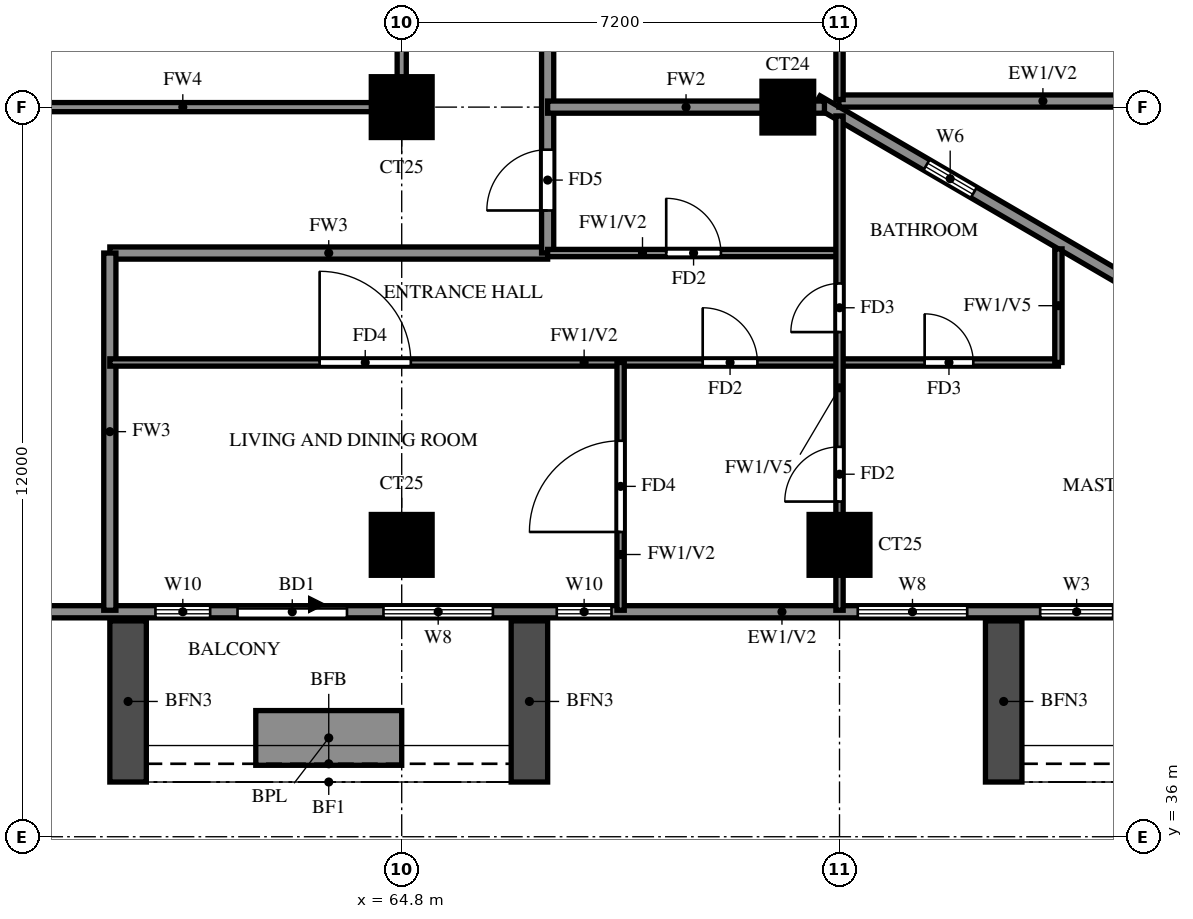
"""IFC4 building model, lengths in metres.
Left out: names, types, materials, properties, quantities, classifications, styles, units other than length and angle.
Written with IfcOpenShell. Run it as: python <this file> out.ifc"""

import sys

from ifc_helpers import new_model, si_unit, direction, frame, frame_2d, origin, origin_2d, place, context, subcontext, project, spatial, rectangle, extrude, source, transform, mapped, element, fill, save


model = new_model("IFC4")
c1 = context("Model", 3, precision=1e-05, world=origin(), true_north=direction((0.0, 1.0)))
c2 = subcontext(c1, "Body", "Model", "MODEL_VIEW")
j1 = project(units=[si_unit("LENGTHUNIT", "METRE"), si_unit("PLANEANGLEUNIT", "RADIAN")], contexts=[c1])
p1 = place(None, origin())
s1 = spatial("IfcSite", under=j1, at=p1, CompositionType="ELEMENT")
p2 = place(p1, origin())
s2 = spatial("IfcBuilding", under=s1, at=p2, CompositionType="ELEMENT")
p3 = place(p2, frame((0.0, 0.0, 153.5)))
s3 = spatial("IfcBuildingStorey", under=s2, at=p3, CompositionType="ELEMENT", Elevation=153.5)
m1 = source(origin(), c2, "Body", "SweptSolid", [
    extrude(rectangle(XDim=1.0, YDim=1.0, at=origin_2d()), origin(), (0.0, 0.0, 1.0), 3.2),
])
for number, where, z_axis, x_axis in (
    (1, (64.8, 40.8, 0.0), (0.0, 0.0, 1.0), (1.0, 0.0, 0.0)),
    (2, (72.0, 40.8, 0.0), (0.0, 0.0, 1.0), (1.0, 0.0, 0.0)),
    (3, (64.8, 48.0, 0.0), (0.0, 0.0, 1.0), (1.0, 0.0, 0.0)),
):
    element("IfcColumn", number, at=place(p3, frame(where, z_axis=z_axis, x_axis=x_axis)), inside=s3, PredefinedType="COLUMN", context=c2, shape_type="MappedRepresentation", body=[
        mapped(m1, transform((0.0, 0.0, 0.0))),
    ])
m2 = source(origin(), c2, "Body", "SweptSolid", [
    extrude(rectangle(XDim=0.85, YDim=0.85, at=origin_2d()), origin(), (0.0, 0.0, 1.0), 3.2),
])
p4 = place(p3, frame((71.15, 48.0, 0.0), z_axis=(0.0, 0.0, 1.0), x_axis=(1.0, 0.0, 0.0)))
e4 = element("IfcColumn", 4, at=p4, inside=s3, PredefinedType="COLUMN", context=c2, shape_type="MappedRepresentation", body=[
    mapped(m2, transform((0.0, 0.0, 0.0))),
])
p5 = place(p3, frame((85.719, 39.881, 0.0), z_axis=(0.0, 0.0, 1.0), x_axis=(-0.86377618652, 0.503875678716, 0.0)))
e5 = element("IfcWall", 5, at=p5, inside=s3, PredefinedType="SOLIDWALL", context=c2, shape_type="SweptSolid", body=[
    extrude(rectangle(XDim=16.311, YDim=0.2, at=frame_2d((8.156, 0.0))), origin(), (0.0, 0.0, 1.0), 3.2),
])
p6 = place(p5, frame((13.326, 0.0, 1.5)))
e6 = element("IfcOpeningElement", 6, at=p6, cuts=e5, PredefinedType="OPENING", context=c2, shape_type="SweptSolid", body=[
    extrude(rectangle(XDim=0.9, YDim=0.9, at=frame_2d((0.45, 0.45))), frame((0.0, 0.11, 0.0), z_axis=(0.0, -1.0, 0.0), x_axis=(1.0, 0.0, 0.0)), (0.0, 0.0, 1.0), 0.22),
])
p7 = place(p3, frame((71.99, 48.1, 0.0), z_axis=(0.0, 0.0, 1.0), x_axis=(1.0, 0.0, 0.0)))
e7 = element("IfcWall", 7, at=p7, inside=s3, PredefinedType="SOLIDWALL", context=c2, shape_type="SweptSolid", body=[
    extrude(rectangle(XDim=6.71, YDim=0.2, at=frame_2d((3.355, 0.0))), origin(), (0.0, 0.0, 1.0), 3.2),
])
p8 = place(p3, frame((58.8, 39.7, 0.0), z_axis=(0.0, 0.0, 1.0), x_axis=(1.0, 0.0, 0.0)))
e8 = element("IfcWall", 8, at=p8, inside=s3, PredefinedType="SOLIDWALL", context=c2, shape_type="SweptSolid", body=[
    extrude(rectangle(XDim=27.23, YDim=0.2, at=frame_2d((13.615, 0.0))), origin(), (0.0, 0.0, 1.0), 3.2),
])
p9 = place(p8, frame((3.3, 0.0, 0.0)))
e9 = element("IfcOpeningElement", 9, at=p9, cuts=e8, PredefinedType="OPENING", context=c2, shape_type="SweptSolid", body=[
    extrude(rectangle(XDim=1.8, YDim=2.4, at=frame_2d((0.9, 1.2))), frame((0.0, 0.11, 0.0), z_axis=(0.0, -1.0, 0.0), x_axis=(1.0, 0.0, 0.0)), (0.0, 0.0, 1.0), 0.22),
])
p10 = place(p8, frame((18.3, 0.0, 0.0)))
e10 = element("IfcOpeningElement", 10, at=p10, cuts=e8, PredefinedType="OPENING", context=c2, shape_type="SweptSolid", body=[
    extrude(rectangle(XDim=1.8, YDim=2.4, at=frame_2d((0.9, 1.2))), frame((0.0, 0.11, 0.0), z_axis=(0.0, -1.0, 0.0), x_axis=(1.0, 0.0, 0.0)), (0.0, 0.0, 1.0), 0.22),
])
p11 = place(p8, frame((1.95, 0.0, 0.6)))
e11 = element("IfcOpeningElement", 11, at=p11, cuts=e8, PredefinedType="OPENING", context=c2, shape_type="SweptSolid", body=[
    extrude(rectangle(XDim=0.9, YDim=2.4, at=frame_2d((0.45, 1.2))), frame((0.0, 0.11, 0.0), z_axis=(0.0, -1.0, 0.0), x_axis=(1.0, 0.0, 0.0)), (0.0, 0.0, 1.0), 0.22),
])
p12 = place(p8, frame((5.7, 0.0, 0.6)))
e12 = element("IfcOpeningElement", 12, at=p12, cuts=e8, PredefinedType="OPENING", context=c2, shape_type="SweptSolid", body=[
    extrude(rectangle(XDim=1.8, YDim=2.4, at=frame_2d((0.9, 1.2))), frame((0.0, 0.11, 0.0), z_axis=(0.0, -1.0, 0.0), x_axis=(1.0, 0.0, 0.0)), (0.0, 0.0, 1.0), 0.22),
])
p13 = place(p8, frame((8.55, 0.0, 0.6)))
e13 = element("IfcOpeningElement", 13, at=p13, cuts=e8, PredefinedType="OPENING", context=c2, shape_type="SweptSolid", body=[
    extrude(rectangle(XDim=0.9, YDim=2.4, at=frame_2d((0.45, 1.2))), frame((0.0, 0.11, 0.0), z_axis=(0.0, -1.0, 0.0), x_axis=(1.0, 0.0, 0.0)), (0.0, 0.0, 1.0), 0.22),
])
p14 = place(p8, frame((13.5, 0.0, 0.6)))
e14 = element("IfcOpeningElement", 14, at=p14, cuts=e8, PredefinedType="OPENING", context=c2, shape_type="SweptSolid", body=[
    extrude(rectangle(XDim=1.8, YDim=2.4, at=frame_2d((0.9, 1.2))), frame((0.0, 0.11, 0.0), z_axis=(0.0, -1.0, 0.0), x_axis=(1.0, 0.0, 0.0)), (0.0, 0.0, 1.0), 0.22),
])
p15 = place(p8, frame((16.5, 0.0, 0.6)))
e15 = element("IfcOpeningElement", 15, at=p15, cuts=e8, PredefinedType="OPENING", context=c2, shape_type="SweptSolid", body=[
    extrude(rectangle(XDim=1.2, YDim=2.4, at=frame_2d((0.6, 1.2))), frame((0.0, 0.11, 0.0), z_axis=(0.0, -1.0, 0.0), x_axis=(1.0, 0.0, 0.0)), (0.0, 0.0, 1.0), 0.22),
])
p16 = place(p8, frame((20.7, 0.0, 0.6)))
e16 = element("IfcOpeningElement", 16, at=p16, cuts=e8, PredefinedType="OPENING", context=c2, shape_type="SweptSolid", body=[
    extrude(rectangle(XDim=1.2, YDim=2.4, at=frame_2d((0.6, 1.2))), frame((0.0, 0.11, 0.0), z_axis=(0.0, -1.0, 0.0), x_axis=(1.0, 0.0, 0.0)), (0.0, 0.0, 1.0), 0.22),
])
p17 = place(p8, frame((23.051, 0.0, 0.6)))
e17 = element("IfcOpeningElement", 17, at=p17, cuts=e8, PredefinedType="OPENING", context=c2, shape_type="SweptSolid", body=[
    extrude(rectangle(XDim=1.8, YDim=2.4, at=frame_2d((0.9, 1.2))), frame((0.0, 0.11, 0.0), z_axis=(0.0, -1.0, 0.0), x_axis=(1.0, 0.0, 0.0)), (0.0, 0.0, 1.0), 0.22),
])
p18 = place(p8, frame((25.99, 0.0, 0.6)))
e18 = element("IfcOpeningElement", 18, at=p18, cuts=e8, PredefinedType="OPENING", context=c2, shape_type="SweptSolid", body=[
    extrude(rectangle(XDim=0.9, YDim=2.4, at=frame_2d((0.45, 1.2))), frame((0.0, 0.11, 0.0), z_axis=(0.0, -1.0, 0.0), x_axis=(1.0, 0.0, 0.0)), (0.0, 0.0, 1.0), 0.22),
])
for number, where, z_axis, x_axis in (
    (19, (60.3, 39.55, 0.0), (0.0, 0.0, 1.0), (0.0, -1.0, 0.0)),
    (20, (66.9, 39.55, 0.0), (0.0, 0.0, 1.0), (0.0, -1.0, 0.0)),
):
    element("IfcWall", number, at=place(p3, frame(where, z_axis=z_axis, x_axis=x_axis)), inside=s3, PredefinedType="SOLIDWALL", context=c2, shape_type="SweptSolid", body=[
        extrude(rectangle(XDim=2.65, YDim=0.6, at=frame_2d((1.325, 0.0))), origin(), (0.0, 0.0, 1.0), 2.85),
    ])
p19 = place(p3, frame((62.4, 37.625, 0.0), z_axis=(0.0, 0.0, 1.0), x_axis=(1.0, 0.0, 0.0)))
e21 = element("IfcWall", 21, at=p19, inside=s3, PredefinedType="SOLIDWALL", context=c2, shape_type="SweptSolid", body=[
    extrude(rectangle(XDim=2.4, YDim=0.9, at=frame_2d((1.2, 0.0))), origin(), (0.0, 0.0, 1.0), 0.9),
])
p20 = place(p3, frame((74.7, 39.55, 0.0), z_axis=(0.0, 0.0, 1.0), x_axis=(0.0, -1.0, 0.0)))
e22 = element("IfcWall", 22, at=p20, inside=s3, PredefinedType="SOLIDWALL", context=c2, shape_type="SweptSolid", body=[
    extrude(rectangle(XDim=2.65, YDim=0.6, at=frame_2d((1.325, 0.0))), origin(), (0.0, 0.0, 1.0), 2.85),
])
p21 = place(p3, frame((60.0, 45.6, 0.0), z_axis=(0.0, 0.0, 1.0), x_axis=(1.0, 0.0, 0.0)))
e23 = element("IfcWall", 23, at=p21, inside=s3, PredefinedType="SOLIDWALL", context=c2, shape_type="SweptSolid", body=[
    extrude(rectangle(XDim=7.2, YDim=0.2, at=frame_2d((3.6, 0.0))), origin(), (0.0, 0.0, 1.0), 3.2),
])
p22 = place(p3, frame((60.0, 39.725, 0.0), z_axis=(0.0, 0.0, 1.0), x_axis=(0.0, 1.0, 0.0)))
e24 = element("IfcWall", 24, at=p22, inside=s3, PredefinedType="SOLIDWALL", context=c2, shape_type="SweptSolid", body=[
    extrude(rectangle(XDim=5.875, YDim=0.2, at=frame_2d((2.938, 0.0))), origin(), (0.0, 0.0, 1.0), 3.2),
])
p23 = place(p3, frame((67.2, 45.6, 0.0), z_axis=(0.0, 0.0, 1.0), x_axis=(0.0, 1.0, 0.0)))
e25 = element("IfcWall", 25, at=p23, inside=s3, PredefinedType="SOLIDWALL", context=c2, shape_type="SweptSolid", body=[
    extrude(rectangle(XDim=12.0, YDim=0.2, at=frame_2d((6.0, 0.0))), origin(), (0.0, 0.0, 1.0), 3.2),
])
p24 = place(p23, frame((10.3, 0.0, 0.0)))
e26 = element("IfcOpeningElement", 26, at=p24, cuts=e25, PredefinedType="OPENING", context=c2, shape_type="SweptSolid", body=[
    extrude(rectangle(XDim=1.0, YDim=2.1, at=frame_2d((0.5, 1.05))), frame((0.0, 0.11, 0.0), z_axis=(0.0, -1.0, 0.0), x_axis=(1.0, 0.0, 0.0)), (0.0, 0.0, 1.0), 0.22),
])
p25 = place(p23, frame((0.7, 0.0, 0.0)))
e27 = element("IfcOpeningElement", 27, at=p25, cuts=e25, PredefinedType="OPENING", context=c2, shape_type="SweptSolid", body=[
    extrude(rectangle(XDim=1.0, YDim=2.1, at=frame_2d((0.5, 1.05))), frame((0.0, 0.11, 0.0), z_axis=(0.0, -1.0, 0.0), x_axis=(1.0, 0.0, 0.0)), (0.0, 0.0, 1.0), 0.22),
])
p26 = place(p3, frame((67.2, 48.0, 0.0), z_axis=(0.0, 0.0, 1.0), x_axis=(1.0, 0.0, 0.0)))
e28 = element("IfcWall", 28, at=p26, inside=s3, PredefinedType="SOLIDWALL", context=c2, shape_type="SweptSolid", body=[
    extrude(rectangle(XDim=4.552, YDim=0.2, at=frame_2d((2.276, 0.0))), origin(), (0.0, 0.0, 1.0), 3.2),
])
p27 = place(p3, frame((60.0, 43.8, 0.0), z_axis=(0.0, 0.0, 1.0), x_axis=(1.0, 0.0, 0.0)))
e29 = element("IfcWall", 29, at=p27, inside=s3, PredefinedType="PARTITIONING", context=c2, shape_type="SweptSolid", body=[
    extrude(rectangle(XDim=15.6, YDim=0.12, at=frame_2d((7.8, 0.0))), origin(), (0.0, 0.0, 1.0), 3.2),
])
p28 = place(p27, frame((9.75, 0.0, 0.0)))
e30 = element("IfcOpeningElement", 30, at=p28, cuts=e29, PredefinedType="OPENING", context=c2, shape_type="SweptSolid", body=[
    extrude(rectangle(XDim=0.9, YDim=2.1, at=frame_2d((0.45, 1.05))), frame((0.0, 0.07, 0.0), z_axis=(0.0, -1.0, 0.0), x_axis=(1.0, 0.0, 0.0)), (0.0, 0.0, 1.0), 0.14),
])
p29 = place(p27, frame((3.45, 0.0, 0.0)))
e31 = element("IfcOpeningElement", 31, at=p29, cuts=e29, PredefinedType="OPENING", context=c2, shape_type="SweptSolid", body=[
    extrude(rectangle(XDim=1.5, YDim=2.1, at=frame_2d((0.75, 1.05))), frame((0.0, 0.07, 0.0), z_axis=(0.0, -1.0, 0.0), x_axis=(1.0, 0.0, 0.0)), (0.0, 0.0, 1.0), 0.14),
])
p30 = place(p27, frame((13.4, 0.0, 0.0)))
e32 = element("IfcOpeningElement", 32, at=p30, cuts=e29, PredefinedType="OPENING", context=c2, shape_type="SweptSolid", body=[
    extrude(rectangle(XDim=0.8, YDim=2.1, at=frame_2d((0.4, 1.05))), frame((0.0, 0.07, 0.0), z_axis=(0.0, -1.0, 0.0), x_axis=(1.0, 0.0, 0.0)), (0.0, 0.0, 1.0), 0.14),
])
p31 = place(p3, frame((67.2, 45.6, 0.0), z_axis=(0.0, 0.0, 1.0), x_axis=(1.0, 0.0, 0.0)))
e33 = element("IfcWall", 33, at=p31, inside=s3, PredefinedType="PARTITIONING", context=c2, shape_type="SweptSolid", body=[
    extrude(rectangle(XDim=4.8, YDim=0.12, at=frame_2d((2.4, 0.0))), origin(), (0.0, 0.0, 1.0), 3.2),
])
p32 = place(p31, frame((1.95, 0.0, 0.0)))
e34 = element("IfcOpeningElement", 34, at=p32, cuts=e33, PredefinedType="OPENING", context=c2, shape_type="SweptSolid", body=[
    extrude(rectangle(XDim=0.9, YDim=2.1, at=frame_2d((0.45, 1.05))), frame((0.0, 0.07, 0.0), z_axis=(0.0, -1.0, 0.0), x_axis=(1.0, 0.0, 0.0)), (0.0, 0.0, 1.0), 0.14),
])
p33 = place(p3, frame((68.4, 39.725, 0.0), z_axis=(0.0, 0.0, 1.0), x_axis=(0.0, 1.0, 0.0)))
e35 = element("IfcWall", 35, at=p33, inside=s3, PredefinedType="PARTITIONING", context=c2, shape_type="SweptSolid", body=[
    extrude(rectangle(XDim=4.075, YDim=0.12, at=frame_2d((2.038, 0.0))), origin(), (0.0, 0.0, 1.0), 3.2),
])
p34 = place(p33, frame((1.288, 0.0, 0.0)))
e36 = element("IfcOpeningElement", 36, at=p34, cuts=e35, PredefinedType="OPENING", context=c2, shape_type="SweptSolid", body=[
    extrude(rectangle(XDim=1.5, YDim=2.1, at=frame_2d((0.75, 1.05))), frame((0.0, 0.07, 0.0), z_axis=(0.0, -1.0, 0.0), x_axis=(1.0, 0.0, 0.0)), (0.0, 0.0, 1.0), 0.14),
])
p35 = place(p3, frame((72.0, 39.725, 0.0), z_axis=(0.0, 0.0, 1.0), x_axis=(0.0, 1.0, 0.0)))
e37 = element("IfcWall", 37, at=p35, inside=s3, PredefinedType="PARTITIONING", context=c2, shape_type="SweptSolid", body=[
    extrude(rectangle(XDim=8.13, YDim=0.12, at=frame_2d((4.065, 0.0))), origin(), (0.0, 0.0, 1.0), 2.3),
])
p36 = place(p35, frame((1.788, 0.0, 0.0)))
e38 = element("IfcOpeningElement", 38, at=p36, cuts=e37, PredefinedType="OPENING", context=c2, shape_type="SweptSolid", body=[
    extrude(rectangle(XDim=0.9, YDim=2.1, at=frame_2d((0.45, 1.05))), frame((0.0, 0.07, 0.0), z_axis=(0.0, -1.0, 0.0), x_axis=(1.0, 0.0, 0.0)), (0.0, 0.0, 1.0), 0.14),
])
p37 = place(p35, frame((4.575, 0.0, 0.0)))
e39 = element("IfcOpeningElement", 39, at=p37, cuts=e37, PredefinedType="OPENING", context=c2, shape_type="SweptSolid", body=[
    extrude(rectangle(XDim=0.8, YDim=2.1, at=frame_2d((0.4, 1.05))), frame((0.0, 0.07, 0.0), z_axis=(0.0, -1.0, 0.0), x_axis=(1.0, 0.0, 0.0)), (0.0, 0.0, 1.0), 0.14),
])
p38 = place(p3, frame((72.0, 48.125, 0.0), z_axis=(0.0, 0.0, 1.0), x_axis=(0.0, 1.0, 0.0)))
e40 = element("IfcWall", 40, at=p38, inside=s3, PredefinedType="PARTITIONING", context=c2, shape_type="SweptSolid", body=[
    extrude(rectangle(XDim=7.075, YDim=0.12, at=frame_2d((3.538, 0.0))), origin(), (0.0, 0.0, 1.0), 3.2),
])
p39 = place(p3, frame((75.6, 43.8, 0.0), z_axis=(0.0, 0.0, 1.0), x_axis=(0.0, 1.0, 0.0)))
e41 = element("IfcWall", 41, at=p39, inside=s3, PredefinedType="PARTITIONING", context=c2, shape_type="SweptSolid", body=[
    extrude(rectangle(XDim=1.868, YDim=0.12, at=frame_2d((0.934, 0.0))), origin(), (0.0, 0.0, 1.0), 2.3),
])
p40 = place(p3, frame((57.6, 48.0, 0.0), z_axis=(0.0, 0.0, 1.0), x_axis=(1.0, 0.0, 0.0)))
e42 = element("IfcWall", 42, at=p40, inside=s3, PredefinedType="SOLIDWALL", context=c2, shape_type="SweptSolid", body=[
    extrude(rectangle(XDim=7.2, YDim=0.15, at=frame_2d((3.6, 0.0))), origin(), (0.0, 0.0, 1.0), 2.3),
])
p41 = place(p3, frame((64.8, 48.0, 0.0), z_axis=(0.0, 0.0, 1.0), x_axis=(0.0, 1.0, 0.0)))
e43 = element("IfcWall", 43, at=p41, inside=s3, PredefinedType="SOLIDWALL", context=c2, shape_type="SweptSolid", body=[
    extrude(rectangle(XDim=14.4, YDim=0.15, at=frame_2d((7.2, 0.0))), origin(), (0.0, 0.0, 1.0), 2.3),
])
p42 = place(p6, origin())
e44 = element("IfcWindow", 44, at=p42, inside=s3, PartitioningType="SINGLE_PANEL", PredefinedType="WINDOW", context=c2, shape_type="SweptSolid", body=[
    extrude(rectangle(XDim=0.9, YDim=0.9, at=frame_2d((0.45, 0.45))), frame((0.0, 0.03, 0.0), z_axis=(0.0, -1.0, 0.0), x_axis=(1.0, 0.0, 0.0)), (0.0, 0.0, 1.0), 0.06),
])
fill(e6, e44)
p43 = place(p9, origin())
e45 = element("IfcDoor", 45, at=p43, inside=s3, OperationType="DOUBLE_DOOR_SLIDING", PredefinedType="DOOR", context=c2, shape_type="SweptSolid", body=[
    extrude(rectangle(XDim=1.8, YDim=2.4, at=frame_2d((0.9, 1.2))), frame((0.0, 0.025, 0.0), z_axis=(0.0, -1.0, 0.0), x_axis=(1.0, 0.0, 0.0)), (0.0, 0.0, 1.0), 0.05),
])
fill(e9, e45)
p44 = place(p11, origin())
e46 = element("IfcWindow", 46, at=p44, inside=s3, PartitioningType="SINGLE_PANEL", PredefinedType="WINDOW", context=c2, shape_type="SweptSolid", body=[
    extrude(rectangle(XDim=0.9, YDim=2.4, at=frame_2d((0.45, 1.2))), frame((0.0, 0.03, 0.0), z_axis=(0.0, -1.0, 0.0), x_axis=(1.0, 0.0, 0.0)), (0.0, 0.0, 1.0), 0.06),
])
fill(e11, e46)
p45 = place(p12, origin())
e47 = element("IfcWindow", 47, at=p45, inside=s3, PartitioningType="DOUBLE_PANEL_VERTICAL", PredefinedType="WINDOW", context=c2, shape_type="SweptSolid", body=[
    extrude(rectangle(XDim=1.8, YDim=2.4, at=frame_2d((0.9, 1.2))), frame((0.0, 0.03, 0.0), z_axis=(0.0, -1.0, 0.0), x_axis=(1.0, 0.0, 0.0)), (0.0, 0.0, 1.0), 0.06),
])
fill(e12, e47)
p46 = place(p13, origin())
e48 = element("IfcWindow", 48, at=p46, inside=s3, PartitioningType="SINGLE_PANEL", PredefinedType="WINDOW", context=c2, shape_type="SweptSolid", body=[
    extrude(rectangle(XDim=0.9, YDim=2.4, at=frame_2d((0.45, 1.2))), frame((0.0, 0.03, 0.0), z_axis=(0.0, -1.0, 0.0), x_axis=(1.0, 0.0, 0.0)), (0.0, 0.0, 1.0), 0.06),
])
fill(e13, e48)
p47 = place(p14, origin())
e49 = element("IfcWindow", 49, at=p47, inside=s3, PartitioningType="DOUBLE_PANEL_VERTICAL", PredefinedType="WINDOW", context=c2, shape_type="SweptSolid", body=[
    extrude(rectangle(XDim=1.8, YDim=2.4, at=frame_2d((0.9, 1.2))), frame((0.0, 0.03, 0.0), z_axis=(0.0, -1.0, 0.0), x_axis=(1.0, 0.0, 0.0)), (0.0, 0.0, 1.0), 0.06),
])
fill(e14, e49)
p48 = place(p15, origin())
e50 = element("IfcWindow", 50, at=p48, inside=s3, PartitioningType="SINGLE_PANEL", PredefinedType="WINDOW", context=c2, shape_type="SweptSolid", body=[
    extrude(rectangle(XDim=1.2, YDim=2.4, at=frame_2d((0.6, 1.2))), frame((0.0, 0.03, 0.0), z_axis=(0.0, -1.0, 0.0), x_axis=(1.0, 0.0, 0.0)), (0.0, 0.0, 1.0), 0.06),
])
fill(e15, e50)
p49 = place(p34, origin())
e51 = element("IfcDoor", 51, at=p49, inside=s3, OperationType="SINGLE_SWING_RIGHT", PredefinedType="DOOR", context=c2, shape_type="SweptSolid", body=[
    extrude(rectangle(XDim=1.5, YDim=2.1, at=frame_2d((0.75, 1.05))), frame((0.0, 0.025, 0.0), z_axis=(0.0, -1.0, 0.0), x_axis=(1.0, 0.0, 0.0)), (0.0, 0.0, 1.0), 0.05),
])
fill(e36, e51)
p50 = place(p32, origin())
e52 = element("IfcDoor", 52, at=p50, inside=s3, OperationType="SINGLE_SWING_LEFT", PredefinedType="DOOR", context=c2, shape_type="SweptSolid", body=[
    extrude(rectangle(XDim=0.9, YDim=2.1, at=frame_2d((0.45, 1.05))), frame((0.0, 0.025, 0.0), z_axis=(0.0, -1.0, 0.0), x_axis=(1.0, 0.0, 0.0)), (0.0, 0.0, 1.0), 0.05),
])
fill(e34, e52)
p51 = place(p25, origin())
e53 = element("IfcDoor", 53, at=p51, inside=s3, OperationType="SINGLE_SWING_LEFT", PredefinedType="DOOR", context=c2, shape_type="SweptSolid", body=[
    extrude(rectangle(XDim=1.0, YDim=2.1, at=frame_2d((0.5, 1.05))), frame((0.0, 0.025, 0.0), z_axis=(0.0, -1.0, 0.0), x_axis=(1.0, 0.0, 0.0)), (0.0, 0.0, 1.0), 0.05),
])
fill(e27, e53)
p52 = place(p28, origin())
e54 = element("IfcDoor", 54, at=p52, inside=s3, OperationType="SINGLE_SWING_RIGHT", PredefinedType="DOOR", context=c2, shape_type="SweptSolid", body=[
    extrude(rectangle(XDim=0.9, YDim=2.1, at=frame_2d((0.45, 1.05))), frame((0.0, 0.025, 0.0), z_axis=(0.0, -1.0, 0.0), x_axis=(1.0, 0.0, 0.0)), (0.0, 0.0, 1.0), 0.05),
])
fill(e30, e54)
p53 = place(p29, origin())
e55 = element("IfcDoor", 55, at=p53, inside=s3, OperationType="SINGLE_SWING_LEFT", PredefinedType="DOOR", context=c2, shape_type="SweptSolid", body=[
    extrude(rectangle(XDim=1.5, YDim=2.1, at=frame_2d((0.75, 1.05))), frame((0.0, 0.025, 0.0), z_axis=(0.0, -1.0, 0.0), x_axis=(1.0, 0.0, 0.0)), (0.0, 0.0, 1.0), 0.05),
])
fill(e31, e55)
p54 = place(p36, origin())
e56 = element("IfcDoor", 56, at=p54, inside=s3, OperationType="SINGLE_SWING_RIGHT", PredefinedType="DOOR", context=c2, shape_type="SweptSolid", body=[
    extrude(rectangle(XDim=0.9, YDim=2.1, at=frame_2d((0.45, 1.05))), frame((0.0, 0.025, 0.0), z_axis=(0.0, -1.0, 0.0), x_axis=(1.0, 0.0, 0.0)), (0.0, 0.0, 1.0), 0.05),
])
fill(e38, e56)
p55 = place(p37, origin())
e57 = element("IfcDoor", 57, at=p55, inside=s3, OperationType="SINGLE_SWING_RIGHT", PredefinedType="DOOR", context=c2, shape_type="SweptSolid", body=[
    extrude(rectangle(XDim=0.8, YDim=2.1, at=frame_2d((0.4, 1.05))), frame((0.0, 0.025, 0.0), z_axis=(0.0, -1.0, 0.0), x_axis=(1.0, 0.0, 0.0)), (0.0, 0.0, 1.0), 0.05),
])
fill(e39, e57)
p56 = place(p30, origin())
e58 = element("IfcDoor", 58, at=p56, inside=s3, OperationType="SINGLE_SWING_LEFT", PredefinedType="DOOR", context=c2, shape_type="SweptSolid", body=[
    extrude(rectangle(XDim=0.8, YDim=2.1, at=frame_2d((0.4, 1.05))), frame((0.0, 0.025, 0.0), z_axis=(0.0, -1.0, 0.0), x_axis=(1.0, 0.0, 0.0)), (0.0, 0.0, 1.0), 0.05),
])
fill(e32, e58)
save(model, sys.argv[1])
